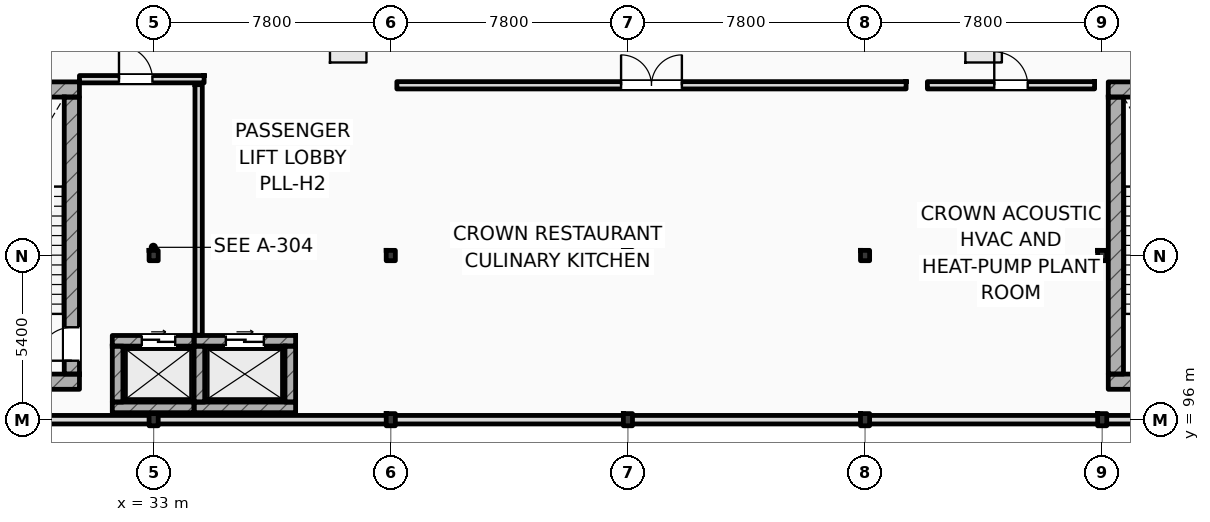
"""IFC4 building model, lengths in metres.
Left out: names, types, materials, properties, quantities, classifications, styles, units other than length and angle.
Written with IfcOpenShell. Run it as: python <this file> out.ifc"""

import sys

from ifc_helpers import new_model, si_unit, direction, frame, frame_2d, origin, origin_2d, place, context, subcontext, project, spatial, rectangle, i_section, extrude, element, fill, save


model = new_model("IFC4")
c1 = context("Model", 3, precision=1e-05, world=origin(), true_north=direction((0.0, 1.0)))
c2 = subcontext(c1, "Body", "Model", "MODEL_VIEW")
j1 = project(units=[si_unit("LENGTHUNIT", "METRE"), si_unit("PLANEANGLEUNIT", "RADIAN")], contexts=[c1])
p1 = place(None, origin())
s1 = spatial("IfcSite", under=j1, at=p1, CompositionType="ELEMENT")
p2 = place(p1, origin())
s2 = spatial("IfcBuilding", under=s1, at=p2, CompositionType="ELEMENT")
p3 = place(p2, frame((0.0, 0.0, 46.8)))
s3 = spatial("IfcBuildingStorey", under=s2, at=p3, CompositionType="ELEMENT", Elevation=46.8)
p4 = place(p3, frame((33.0, 96.0, 0.0), z_axis=(0.0, 0.0, 1.0), x_axis=(1.0, 0.0, 0.0)))
e1 = element("IfcColumn", 1, at=p4, inside=s3, PredefinedType="COLUMN", context=c2, shape_type="SweptSolid", body=[
    extrude(i_section(OverallWidth=0.3, OverallDepth=0.4, WebThickness=0.013, FlangeThickness=0.024, FilletRadius=0.027, at=origin_2d()), origin(), (0.0, 0.0, 1.0), 4.8),
])
p5 = place(p3, frame((33.0, 101.4, 0.0), z_axis=(0.0, 0.0, 1.0), x_axis=(1.0, 0.0, 0.0)))
e2 = element("IfcColumn", 2, at=p5, inside=s3, PredefinedType="COLUMN", context=c2, shape_type="SweptSolid", body=[
    extrude(i_section(OverallWidth=0.3, OverallDepth=0.34, WebThickness=0.012, FlangeThickness=0.021, FilletRadius=0.027, at=origin_2d()), origin(), (0.0, 0.0, 1.0), 4.8),
])
p6 = place(p3, frame((40.8, 96.0, 0.0), z_axis=(0.0, 0.0, 1.0), x_axis=(1.0, 0.0, 0.0)))
e3 = element("IfcColumn", 3, at=p6, inside=s3, PredefinedType="COLUMN", context=c2, shape_type="SweptSolid", body=[
    extrude(i_section(OverallWidth=0.3, OverallDepth=0.4, WebThickness=0.013, FlangeThickness=0.024, FilletRadius=0.027, at=origin_2d()), origin(), (0.0, 0.0, 1.0), 4.8),
])
p7 = place(p3, frame((40.8, 101.4, 0.0), z_axis=(0.0, 0.0, 1.0), x_axis=(1.0, 0.0, 0.0)))
e4 = element("IfcColumn", 4, at=p7, inside=s3, PredefinedType="COLUMN", context=c2, shape_type="SweptSolid", body=[
    extrude(i_section(OverallWidth=0.3, OverallDepth=0.34, WebThickness=0.012, FlangeThickness=0.021, FilletRadius=0.027, at=origin_2d()), origin(), (0.0, 0.0, 1.0), 4.8),
])
p8 = place(p3, frame((48.6, 96.0, 0.0), z_axis=(0.0, 0.0, 1.0), x_axis=(1.0, 0.0, 0.0)))
e5 = element("IfcColumn", 5, at=p8, inside=s3, PredefinedType="COLUMN", context=c2, shape_type="SweptSolid", body=[
    extrude(i_section(OverallWidth=0.3, OverallDepth=0.4, WebThickness=0.013, FlangeThickness=0.024, FilletRadius=0.027, at=origin_2d()), origin(), (0.0, 0.0, 1.0), 4.8),
])
p9 = place(p3, frame((48.6, 101.4, 0.0), z_axis=(0.0, 0.0, 1.0), x_axis=(1.0, 0.0, 0.0)))
e6 = element("IfcColumn", 6, at=p9, inside=s3, PredefinedType="COLUMN", context=c2, shape_type="SweptSolid", body=[
    extrude(i_section(OverallWidth=0.3, OverallDepth=0.34, WebThickness=0.012, FlangeThickness=0.021, FilletRadius=0.027, at=origin_2d()), origin(), (0.0, 0.0, 1.0), 4.8),
])
p10 = place(p3, frame((56.4, 96.0, 0.0), z_axis=(0.0, 0.0, 1.0), x_axis=(1.0, 0.0, 0.0)))
e7 = element("IfcColumn", 7, at=p10, inside=s3, PredefinedType="COLUMN", context=c2, shape_type="SweptSolid", body=[
    extrude(i_section(OverallWidth=0.3, OverallDepth=0.4, WebThickness=0.013, FlangeThickness=0.024, FilletRadius=0.027, at=origin_2d()), origin(), (0.0, 0.0, 1.0), 4.8),
])
p11 = place(p3, frame((56.4, 101.4, 0.0), z_axis=(0.0, 0.0, 1.0), x_axis=(1.0, 0.0, 0.0)))
e8 = element("IfcColumn", 8, at=p11, inside=s3, PredefinedType="COLUMN", context=c2, shape_type="SweptSolid", body=[
    extrude(i_section(OverallWidth=0.3, OverallDepth=0.34, WebThickness=0.012, FlangeThickness=0.021, FilletRadius=0.027, at=origin_2d()), origin(), (0.0, 0.0, 1.0), 4.8),
])
p12 = place(p3, frame((64.2, 96.0, 0.0), z_axis=(0.0, 0.0, 1.0), x_axis=(1.0, 0.0, 0.0)))
e9 = element("IfcColumn", 9, at=p12, inside=s3, PredefinedType="COLUMN", context=c2, shape_type="SweptSolid", body=[
    extrude(i_section(OverallWidth=0.3, OverallDepth=0.4, WebThickness=0.013, FlangeThickness=0.024, FilletRadius=0.027, at=origin_2d()), origin(), (0.0, 0.0, 1.0), 4.8),
])
p13 = place(p3, frame((64.2, 101.4, 0.0), z_axis=(0.0, 0.0, 1.0), x_axis=(1.0, 0.0, 0.0)))
e10 = element("IfcColumn", 10, at=p13, inside=s3, PredefinedType="COLUMN", context=c2, shape_type="SweptSolid", body=[
    extrude(i_section(OverallWidth=0.3, OverallDepth=0.34, WebThickness=0.012, FlangeThickness=0.021, FilletRadius=0.027, at=origin_2d()), origin(), (0.0, 0.0, 1.0), 4.8),
])
for number, where, z_axis, x_axis in (
    (11, (25.4, 106.862, 0.0), (0.0, 0.0, 1.0), (1.0, 0.0, 0.0)),
    (12, (25.4, 97.25, 0.0), (0.0, 0.0, 1.0), (1.0, 0.0, 0.0)),
):
    element("IfcWall", number, at=place(p3, frame(where, z_axis=z_axis, x_axis=x_axis)), inside=s3, PredefinedType="SHEAR", context=c2, shape_type="SweptSolid", body=[
        extrude(rectangle(XDim=5.16, YDim=0.5, at=frame_2d((2.58, 0.0))), origin(), (0.0, 0.0, 1.0), 4.8),
    ])
p14 = place(p3, frame((30.31, 97.5, 0.0), z_axis=(0.0, 0.0, 1.0), x_axis=(0.0, 1.0, 0.0)))
e13 = element("IfcWall", 13, at=p14, inside=s3, PredefinedType="SHEAR", context=c2, shape_type="SweptSolid", body=[
    extrude(rectangle(XDim=9.112, YDim=0.5, at=frame_2d((4.556, 0.0))), origin(), (0.0, 0.0, 1.0), 4.8),
])
p15 = place(p14, frame((0.44, 0.0, 0.0)))
e14 = element("IfcOpeningElement", 14, at=p15, cuts=e13, PredefinedType="OPENING", context=c2, shape_type="SweptSolid", body=[
    extrude(rectangle(XDim=1.1, YDim=2.2, at=frame_2d((0.55, 1.1))), frame((0.0, 0.26, 0.0), z_axis=(0.0, -1.0, 0.0), x_axis=(1.0, 0.0, 0.0)), (0.0, 0.0, 1.0), 0.52),
])
for number, where, z_axis, x_axis in (
    (15, (64.4, 106.862, 0.0), (0.0, 0.0, 1.0), (1.0, 0.0, 0.0)),
    (16, (64.4, 97.25, 0.0), (0.0, 0.0, 1.0), (1.0, 0.0, 0.0)),
):
    element("IfcWall", number, at=place(p3, frame(where, z_axis=z_axis, x_axis=x_axis)), inside=s3, PredefinedType="SHEAR", context=c2, shape_type="SweptSolid", body=[
        extrude(rectangle(XDim=5.16, YDim=0.5, at=frame_2d((2.58, 0.0))), origin(), (0.0, 0.0, 1.0), 4.8),
    ])
p16 = place(p3, frame((64.65, 97.5, 0.0), z_axis=(0.0, 0.0, 1.0), x_axis=(0.0, 1.0, 0.0)))
e17 = element("IfcWall", 17, at=p16, inside=s3, PredefinedType="SHEAR", context=c2, shape_type="SweptSolid", body=[
    extrude(rectangle(XDim=9.112, YDim=0.5, at=frame_2d((4.556, 0.0))), origin(), (0.0, 0.0, 1.0), 4.8),
])
p17 = place(p3, frame((25.2, 96.0, 0.0), z_axis=(0.0, 0.0, 1.0), x_axis=(1.0, 0.0, 0.0)))
e18 = element("IfcWall", 18, at=p17, inside=s3, PredefinedType="STANDARD", context=c2, shape_type="SweptSolid", body=[
    extrude(rectangle(XDim=54.6, YDim=0.28, at=frame_2d((27.3, 0.0))), origin(), (0.0, 0.0, 1.0), 4.08),
])
p18 = place(p3, frame((31.64, 98.595, 0.0), z_axis=(0.0, 0.0, 1.0), x_axis=(1.0, 0.0, 0.0)))
e19 = element("IfcWall", 19, at=p18, inside=s3, PredefinedType="SHEAR", context=c2, shape_type="SweptSolid", body=[
    extrude(rectangle(XDim=2.69, YDim=0.35, at=frame_2d((1.345, 0.0))), origin(), (0.0, 0.0, 1.0), 4.54),
])
p19 = place(p18, frame((0.97, 0.0, 0.0)))
e20 = element("IfcOpeningElement", 20, at=p19, cuts=e19, PredefinedType="OPENING", context=c2, shape_type="SweptSolid", body=[
    extrude(rectangle(XDim=1.1, YDim=2.2, at=frame_2d((0.55, 1.1))), frame((0.0, 0.185, 0.0), z_axis=(0.0, -1.0, 0.0), x_axis=(1.0, 0.0, 0.0)), (0.0, 0.0, 1.0), 0.37),
])
p20 = place(p3, frame((31.64, 96.405, 0.0), z_axis=(0.0, 0.0, 1.0), x_axis=(1.0, 0.0, 0.0)))
e21 = element("IfcWall", 21, at=p20, inside=s3, PredefinedType="SHEAR", context=c2, shape_type="SweptSolid", body=[
    extrude(rectangle(XDim=2.69, YDim=0.35, at=frame_2d((1.345, 0.0))), origin(), (0.0, 0.0, 1.0), 4.54),
])
p21 = place(p3, frame((31.815, 96.58, 0.0), z_axis=(0.0, 0.0, 1.0), x_axis=(0.0, 1.0, 0.0)))
e22 = element("IfcWall", 22, at=p21, inside=s3, PredefinedType="SHEAR", context=c2, shape_type="SweptSolid", body=[
    extrude(rectangle(XDim=1.84, YDim=0.35, at=frame_2d((0.92, 0.0))), origin(), (0.0, 0.0, 1.0), 4.54),
])
p22 = place(p3, frame((34.33, 98.595, 0.0), z_axis=(0.0, 0.0, 1.0), x_axis=(1.0, 0.0, 0.0)))
e23 = element("IfcWall", 23, at=p22, inside=s3, PredefinedType="SHEAR", context=c2, shape_type="SweptSolid", body=[
    extrude(rectangle(XDim=3.34, YDim=0.35, at=frame_2d((1.67, 0.0))), origin(), (0.0, 0.0, 1.0), 4.54),
])
p23 = place(p22, frame((1.045, 0.0, 0.0)))
e24 = element("IfcOpeningElement", 24, at=p23, cuts=e23, PredefinedType="OPENING", context=c2, shape_type="SweptSolid", body=[
    extrude(rectangle(XDim=1.25, YDim=2.25, at=frame_2d((0.625, 1.125))), frame((0.0, 0.185, 0.0), z_axis=(0.0, -1.0, 0.0), x_axis=(1.0, 0.0, 0.0)), (0.0, 0.0, 1.0), 0.37),
])
p24 = place(p3, frame((34.33, 96.405, 0.0), z_axis=(0.0, 0.0, 1.0), x_axis=(1.0, 0.0, 0.0)))
e25 = element("IfcWall", 25, at=p24, inside=s3, PredefinedType="SHEAR", context=c2, shape_type="SweptSolid", body=[
    extrude(rectangle(XDim=3.34, YDim=0.35, at=frame_2d((1.67, 0.0))), origin(), (0.0, 0.0, 1.0), 4.54),
])
for number, where, z_axis, x_axis in (
    (26, (34.505, 96.58, 0.0), (0.0, 0.0, 1.0), (0.0, 1.0, 0.0)),
    (27, (37.495, 96.58, 0.0), (0.0, 0.0, 1.0), (0.0, 1.0, 0.0)),
):
    element("IfcWall", number, at=place(p3, frame(where, z_axis=z_axis, x_axis=x_axis)), inside=s3, PredefinedType="SHEAR", context=c2, shape_type="SweptSolid", body=[
        extrude(rectangle(XDim=1.84, YDim=0.35, at=frame_2d((0.92, 0.0))), origin(), (0.0, 0.0, 1.0), 4.54),
    ])
p25 = place(p3, frame((34.48, 98.78, 0.0), z_axis=(0.0, 0.0, 1.0), x_axis=(0.0, 1.0, 0.0)))
e28 = element("IfcWall", 28, at=p25, inside=s3, PredefinedType="STANDARD", context=c2, shape_type="SweptSolid", body=[
    extrude(rectangle(XDim=8.24, YDim=0.24, at=frame_2d((4.12, 0.0))), origin(), (0.0, 0.0, 1.0), 4.54),
])
p26 = place(p3, frame((30.56, 107.2, 0.0), z_axis=(0.0, 0.0, 1.0), x_axis=(1.0, 0.0, 0.0)))
e29 = element("IfcWall", 29, at=p26, inside=s3, PredefinedType="STANDARD", context=c2, shape_type="SweptSolid", body=[
    extrude(rectangle(XDim=4.1, YDim=0.24, at=frame_2d((2.05, 0.0))), origin(), (0.0, 0.0, 1.0), 4.54),
])
p27 = place(p26, frame((1.3, 0.0, 0.0)))
e30 = element("IfcOpeningElement", 30, at=p27, cuts=e29, PredefinedType="OPENING", context=c2, shape_type="SweptSolid", body=[
    extrude(rectangle(XDim=1.1, YDim=2.2, at=frame_2d((0.55, 1.1))), frame((0.0, 0.13, 0.0), z_axis=(0.0, -1.0, 0.0), x_axis=(1.0, 0.0, 0.0)), (0.0, 0.0, 1.0), 0.26),
])
p28 = place(p3, frame((41.0, 107.0, 0.0), z_axis=(0.0, 0.0, 1.0), x_axis=(1.0, 0.0, 0.0)))
e31 = element("IfcWall", 31, at=p28, inside=s3, PredefinedType="STANDARD", context=c2, shape_type="SweptSolid", body=[
    extrude(rectangle(XDim=16.75, YDim=0.24, at=frame_2d((8.375, 0.0))), origin(), (0.0, 0.0, 1.0), 4.54),
])
p29 = place(p28, frame((7.375, 0.0, 0.0)))
e32 = element("IfcOpeningElement", 32, at=p29, cuts=e31, PredefinedType="OPENING", context=c2, shape_type="SweptSolid", body=[
    extrude(rectangle(XDim=2.0, YDim=2.35, at=frame_2d((1.0, 1.175))), frame((0.0, 0.13, 0.0), z_axis=(0.0, -1.0, 0.0), x_axis=(1.0, 0.0, 0.0)), (0.0, 0.0, 1.0), 0.26),
])
p30 = place(p3, frame((58.45, 107.0, 0.0), z_axis=(0.0, 0.0, 1.0), x_axis=(1.0, 0.0, 0.0)))
e33 = element("IfcWall", 33, at=p30, inside=s3, PredefinedType="STANDARD", context=c2, shape_type="SweptSolid", body=[
    extrude(rectangle(XDim=5.5, YDim=0.24, at=frame_2d((2.75, 0.0))), origin(), (0.0, 0.0, 1.0), 4.54),
])
p31 = place(p30, frame((2.2, 0.0, 0.0)))
e34 = element("IfcOpeningElement", 34, at=p31, cuts=e33, PredefinedType="OPENING", context=c2, shape_type="SweptSolid", body=[
    extrude(rectangle(XDim=1.1, YDim=2.2, at=frame_2d((0.55, 1.1))), frame((0.0, 0.13, 0.0), z_axis=(0.0, -1.0, 0.0), x_axis=(1.0, 0.0, 0.0)), (0.0, 0.0, 1.0), 0.26),
])
p32 = place(p2, frame((0.0, 0.0, 51.6)))
p33 = place(p32, frame((0.0, 0.0, -0.26)))
p34 = place(p33, frame((39.4, 108.35, -0.01)))
p35 = place(p34, frame((0.0, 0.0, 0.22)))
e35 = element("IfcWindow", 35, at=p35, inside=s3, PartitioningType="SINGLE_PANEL", PredefinedType="SKYLIGHT", context=c2, shape_type="SweptSolid", body=[
    extrude(rectangle(XDim=1.2, YDim=1.2, at=origin_2d()), origin(), (0.0, 0.0, 1.0), 0.05),
])
p36 = place(p33, frame((60.3, 108.35, -0.01)))
p37 = place(p36, frame((0.0, 0.0, 0.22)))
e36 = element("IfcWindow", 36, at=p37, inside=s3, PartitioningType="SINGLE_PANEL", PredefinedType="SKYLIGHT", context=c2, shape_type="SweptSolid", body=[
    extrude(rectangle(XDim=1.2, YDim=1.2, at=origin_2d()), origin(), (0.0, 0.0, 1.0), 0.05),
])
p38 = place(p15, origin())
e37 = element("IfcDoor", 37, at=p38, inside=s3, OperationType="SINGLE_SWING_LEFT", PredefinedType="DOOR", context=c2, shape_type="SweptSolid", body=[
    extrude(rectangle(XDim=1.1, YDim=2.2, at=frame_2d((0.55, 1.1))), frame((0.0, 0.025, 0.0), z_axis=(0.0, -1.0, 0.0), x_axis=(1.0, 0.0, 0.0)), (0.0, 0.0, 1.0), 0.05),
])
fill(e14, e37)
p39 = place(p19, origin())
e38 = element("IfcDoor", 38, at=p39, inside=s3, OperationType="SLIDING_TO_LEFT", PredefinedType="DOOR", context=c2, shape_type="SweptSolid", body=[
    extrude(rectangle(XDim=1.1, YDim=2.2, at=frame_2d((0.55, 1.1))), frame((0.0, 0.025, 0.0), z_axis=(0.0, -1.0, 0.0), x_axis=(1.0, 0.0, 0.0)), (0.0, 0.0, 1.0), 0.05),
])
fill(e20, e38)
p40 = place(p23, origin())
e39 = element("IfcDoor", 39, at=p40, inside=s3, OperationType="SLIDING_TO_LEFT", PredefinedType="DOOR", context=c2, shape_type="SweptSolid", body=[
    extrude(rectangle(XDim=1.25, YDim=2.25, at=frame_2d((0.625, 1.125))), frame((0.0, 0.025, 0.0), z_axis=(0.0, -1.0, 0.0), x_axis=(1.0, 0.0, 0.0)), (0.0, 0.0, 1.0), 0.05),
])
fill(e24, e39)
p41 = place(p27, origin())
e40 = element("IfcDoor", 40, at=p41, inside=s3, OperationType="SINGLE_SWING_LEFT", PredefinedType="DOOR", context=c2, shape_type="SweptSolid", body=[
    extrude(rectangle(XDim=1.1, YDim=2.2, at=frame_2d((0.55, 1.1))), frame((0.0, 0.025, 0.0), z_axis=(0.0, -1.0, 0.0), x_axis=(1.0, 0.0, 0.0)), (0.0, 0.0, 1.0), 0.05),
])
fill(e30, e40)
p42 = place(p29, origin())
e41 = element("IfcDoor", 41, at=p42, inside=s3, OperationType="DOUBLE_SWING_LEFT", PredefinedType="DOOR", context=c2, shape_type="SweptSolid", body=[
    extrude(rectangle(XDim=2.0, YDim=2.35, at=frame_2d((1.0, 1.175))), frame((0.0, 0.025, 0.0), z_axis=(0.0, -1.0, 0.0), x_axis=(1.0, 0.0, 0.0)), (0.0, 0.0, 1.0), 0.05),
])
fill(e32, e41)
p43 = place(p31, origin())
e42 = element("IfcDoor", 42, at=p43, inside=s3, OperationType="SINGLE_SWING_LEFT", PredefinedType="DOOR", context=c2, shape_type="SweptSolid", body=[
    extrude(rectangle(XDim=1.1, YDim=2.2, at=frame_2d((0.55, 1.1))), frame((0.0, 0.025, 0.0), z_axis=(0.0, -1.0, 0.0), x_axis=(1.0, 0.0, 0.0)), (0.0, 0.0, 1.0), 0.05),
])
fill(e34, e42)
save(model, sys.argv[1])
